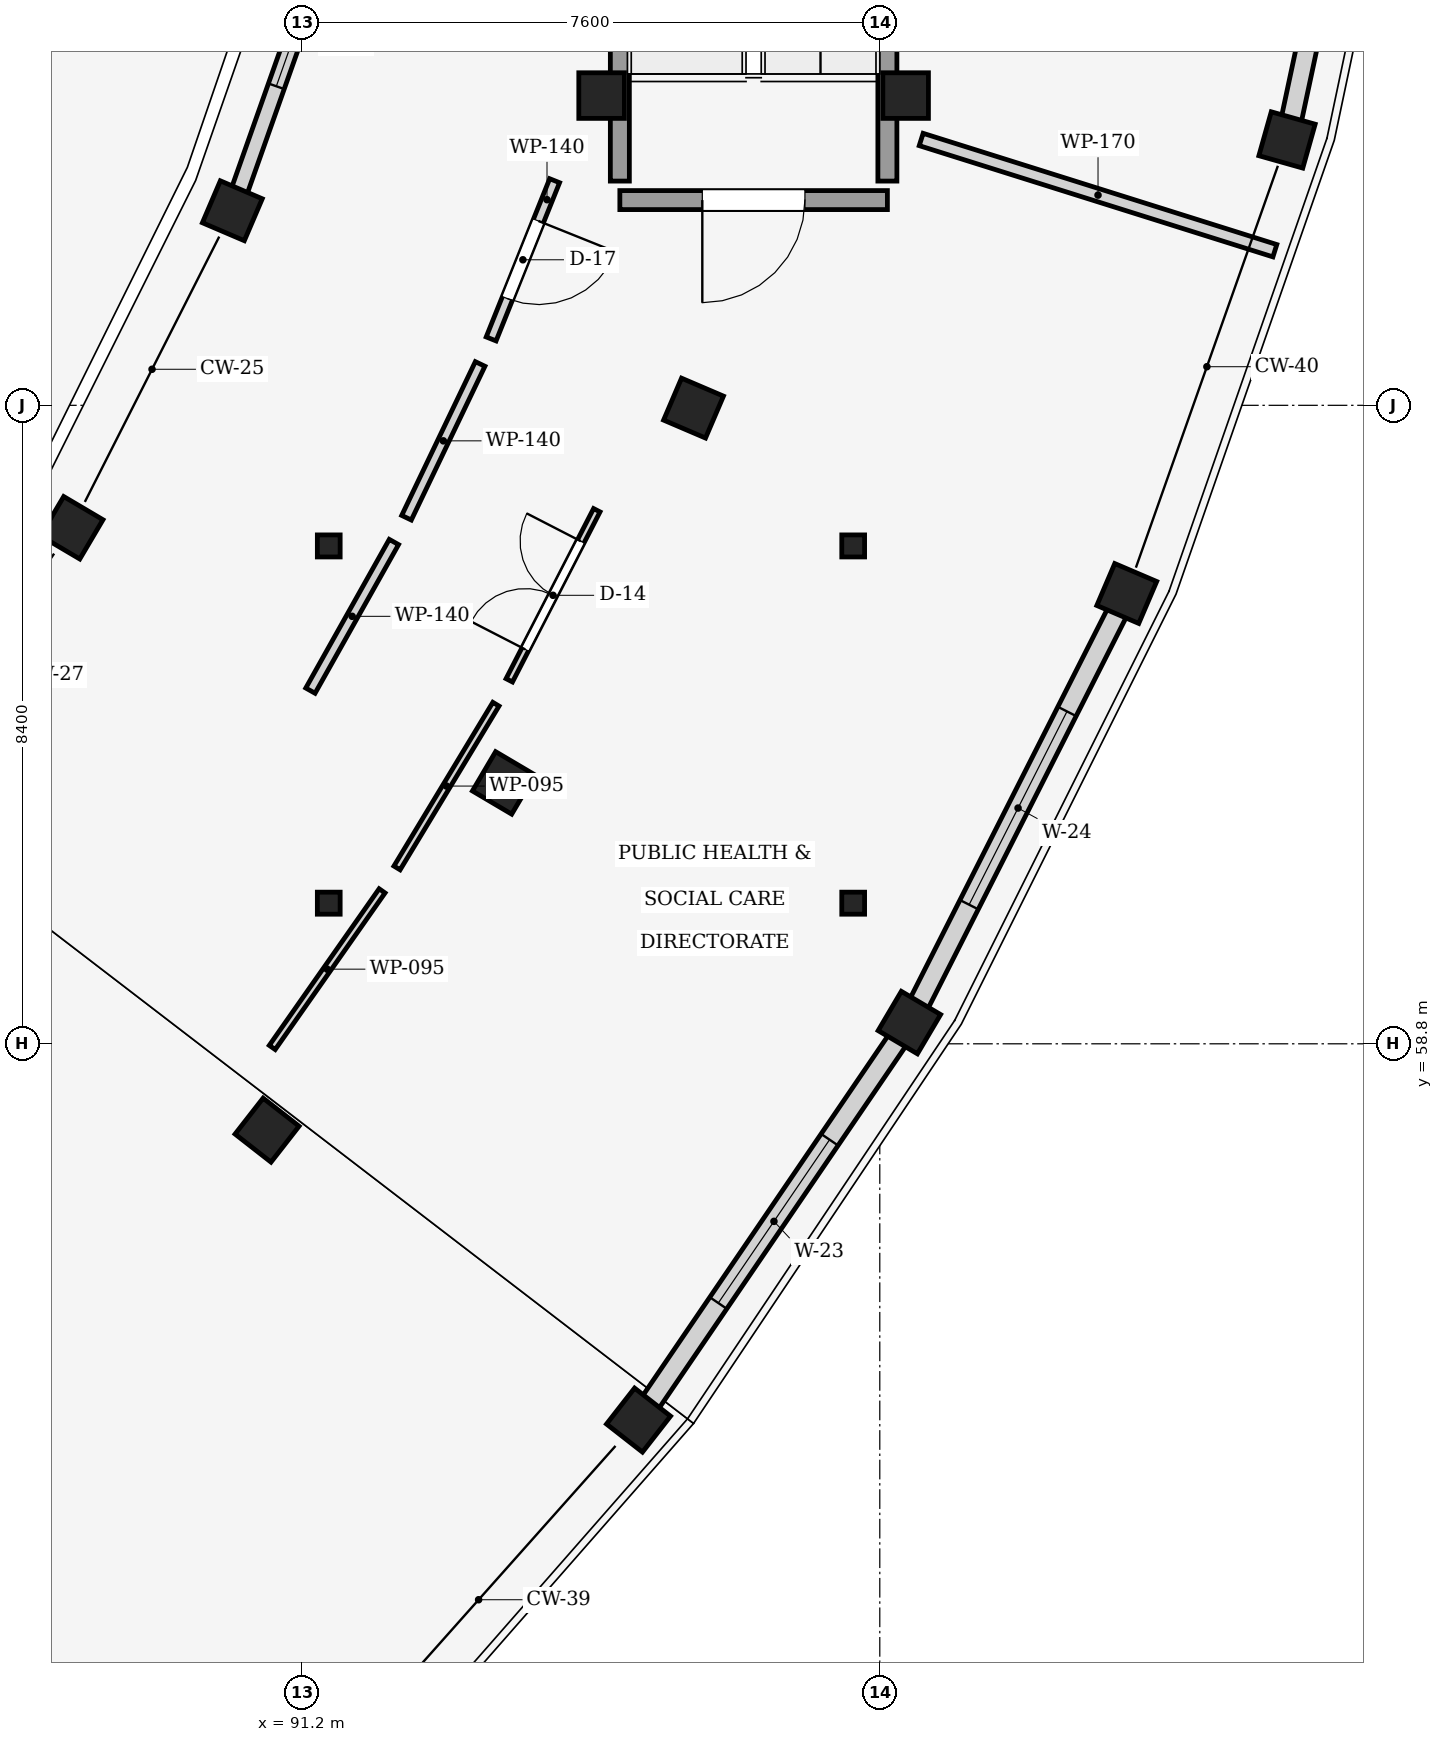
"""IFC4 building model, lengths in metres.
Left out: names, types, materials, properties, quantities, classifications, styles, units other than length and angle.
Written with IfcOpenShell. Run it as: python <this file> out.ifc"""

import sys

from ifc_helpers import new_model, si_unit, direction, frame, frame_2d, origin, origin_2d, place, context, subcontext, project, spatial, rectangle, i_section, extrude, element, fill, save


model = new_model("IFC4")
c1 = context("Model", 3, precision=1e-05, world=origin(), true_north=direction((0.0, 1.0)))
c2 = subcontext(c1, "Body", "Model", "MODEL_VIEW")
j1 = project(units=[si_unit("LENGTHUNIT", "METRE"), si_unit("PLANEANGLEUNIT", "RADIAN")], contexts=[c1])
p1 = place(None, origin())
s1 = spatial("IfcSite", under=j1, at=p1, CompositionType="ELEMENT")
p2 = place(p1, origin())
s2 = spatial("IfcBuilding", under=s1, at=p2, CompositionType="ELEMENT")
p3 = place(p2, frame((0.0, 0.0, 9.15)))
s3 = spatial("IfcBuildingStorey", under=s2, at=p3, CompositionType="ELEMENT", Elevation=9.15)
for number, where, z_axis, x_axis in (
    (1, (90.738, 57.664, 0.0), (0.0, 0.0, 1.0), (0.788, -0.615, 0.0)),
    (2, (95.626, 53.849, 0.0), (0.0, 0.0, 1.0), (0.788, -0.615, 0.0)),
    (3, (88.168, 65.589, 0.0), (0.0, 0.0, 1.0), (0.861, -0.509, 0.0)),
    (4, (93.851, 62.232, 0.0), (0.0, 0.0, 1.0), (0.861, -0.509, 0.0)),
    (5, (99.189, 59.079, 0.0), (0.0, 0.0, 1.0), (0.861, -0.509, 0.0)),
    (6, (90.281, 69.76, 0.0), (0.0, 0.0, 1.0), (0.919, -0.393, 0.0)),
    (7, (96.349, 67.163, 0.0), (0.0, 0.0, 1.0), (0.919, -0.393, 0.0)),
    (8, (102.049, 64.724, 0.0), (0.0, 0.0, 1.0), (0.919, -0.393, 0.0)),
    (9, (104.158, 70.691, 0.0), (0.0, 0.0, 1.0), (0.962, -0.272, 0.0)),
    (10, (99.14, 71.275, 0.0), (0.0, 0.0, 1.0), (1.0, 0.0, 0.0)),
    (11, (95.14, 71.275, 0.0), (0.0, 0.0, 1.0), (1.0, 0.0, 0.0)),
):
    element("IfcColumn", number, at=place(p3, frame(where, z_axis=z_axis, x_axis=x_axis)), inside=s3, PredefinedType="COLUMN", context=c2, shape_type="SweptSolid", body=[
        extrude(rectangle(XDim=0.6, YDim=0.6, at=origin_2d()), origin(), (0.0, 0.0, 1.0), 4.05),
    ])
for number, where, z_axis, x_axis in (
    (12, (91.55, 60.65, 0.0), (0.0, 0.0, 1.0), (1.0, 0.0, 0.0)),
    (13, (98.45, 60.65, 0.0), (0.0, 0.0, 1.0), (1.0, 0.0, 0.0)),
    (14, (98.45, 65.35, 0.0), (0.0, 0.0, 1.0), (1.0, 0.0, 0.0)),
    (15, (91.55, 65.35, 0.0), (0.0, 0.0, 1.0), (1.0, 0.0, 0.0)),
):
    element("IfcColumn", number, at=place(p3, frame(where, z_axis=z_axis, x_axis=x_axis)), inside=s3, PredefinedType="COLUMN", context=c2, shape_type="SweptSolid", body=[
        extrude(i_section(OverallWidth=0.3, OverallDepth=0.29, WebThickness=0.009, FlangeThickness=0.014, at=origin_2d()), origin(), (0.0, 0.0, 1.0), 4.05),
    ])
p4 = place(p3, frame((99.029, 58.844, 0.0), z_axis=(0.0, 0.0, 1.0), x_axis=(-0.563132935525, -0.826366321269, 0.0)))
e16 = element("IfcWall", 16, at=p4, inside=s3, PredefinedType="STANDARD", context=c2, shape_type="SweptSolid", body=[
    extrude(rectangle(XDim=5.76, YDim=0.27, at=frame_2d((2.88, 0.0))), origin(), (0.0, 0.0, 1.0), 3.015),
])
p5 = place(p4, frame((1.58, 0.0, 0.85)))
e17 = element("IfcOpeningElement", 17, at=p5, cuts=e16, PredefinedType="OPENING", context=c2, shape_type="SweptSolid", body=[
    extrude(rectangle(XDim=2.6, YDim=1.65, at=frame_2d((1.3, 0.825))), frame((0.0, 0.145, 0.0), z_axis=(0.0, -1.0, 0.0), x_axis=(1.0, 0.0, 0.0)), (0.0, 0.0, 1.0), 0.29),
])
p6 = place(p3, frame((101.93, 64.49, 0.0), z_axis=(0.0, 0.0, 1.0), x_axis=(-0.451920591159, -0.892058170349, 0.0)))
e18 = element("IfcWall", 18, at=p6, inside=s3, PredefinedType="STANDARD", context=c2, shape_type="SweptSolid", body=[
    extrude(rectangle(XDim=5.802, YDim=0.27, at=frame_2d((2.901, 0.0))), origin(), (0.0, 0.0, 1.0), 3.015),
])
p7 = place(p6, frame((1.476, 0.0, 0.85)))
e19 = element("IfcOpeningElement", 19, at=p7, cuts=e18, PredefinedType="OPENING", context=c2, shape_type="SweptSolid", body=[
    extrude(rectangle(XDim=2.85, YDim=1.65, at=frame_2d((1.425, 0.825))), frame((0.0, 0.145, 0.0), z_axis=(0.0, -1.0, 0.0), x_axis=(1.0, 0.0, 0.0)), (0.0, 0.0, 1.0), 0.29),
])
p8 = place(p3, frame((90.365, 69.995, 0.0), z_axis=(0.0, 0.0, 1.0), x_axis=(0.333168640656, 0.942867253055, 0.0)))
e20 = element("IfcWall", 20, at=p8, inside=s3, PredefinedType="STANDARD", context=c2, shape_type="SweptSolid", body=[
    extrude(rectangle(XDim=4.177, YDim=0.22, at=frame_2d((2.088, 0.0))), origin(), (0.0, 0.0, 1.0), 3.165),
])
p9 = place(p8, frame((1.488, 0.0, 0.85)))
e21 = element("IfcOpeningElement", 21, at=p9, cuts=e20, PredefinedType="OPENING", context=c2, shape_type="SweptSolid", body=[
    extrude(rectangle(XDim=1.2, YDim=1.65, at=frame_2d((0.6, 0.825))), frame((0.0, 0.12, 0.0), z_axis=(0.0, -1.0, 0.0), x_axis=(1.0, 0.0, 0.0)), (0.0, 0.0, 1.0), 0.24),
])
p10 = place(p3, frame((105.43, 76.645, 0.0), z_axis=(0.0, 0.0, 1.0), x_axis=(-0.208873267346, -0.977942717233, 0.0)))
e22 = element("IfcWall", 22, at=p10, inside=s3, PredefinedType="STANDARD", context=c2, shape_type="SweptSolid", body=[
    extrude(rectangle(XDim=5.848, YDim=0.27, at=frame_2d((2.924, 0.0))), origin(), (0.0, 0.0, 1.0), 2.45),
])
p11 = place(p10, frame((2.374, 0.0, 0.85)))
e23 = element("IfcOpeningElement", 23, at=p11, cuts=e22, PredefinedType="OPENING", context=c2, shape_type="SweptSolid", body=[
    extrude(rectangle(XDim=1.1, YDim=1.35, at=frame_2d((0.55, 0.675))), frame((0.0, 0.145, 0.0), z_axis=(0.0, -1.0, 0.0), x_axis=(1.0, 0.0, 0.0)), (0.0, 0.0, 1.0), 0.29),
])
p12 = place(p3, frame((98.9, 69.9, 0.0), z_axis=(0.0, 0.0, 1.0), x_axis=(-1.0, 0.0, 0.0)))
e24 = element("IfcWall", 24, at=p12, inside=s3, PredefinedType="SHEAR", context=c2, shape_type="SweptSolid", body=[
    extrude(rectangle(XDim=3.52, YDim=0.25, at=frame_2d((1.76, 0.0))), origin(), (0.0, 0.0, 1.0), 4.05),
])
p13 = place(p12, frame((1.085, 0.0, 0.0)))
e25 = element("IfcOpeningElement", 25, at=p13, cuts=e24, PredefinedType="OPENING", context=c2, shape_type="SweptSolid", body=[
    extrude(rectangle(XDim=1.35, YDim=2.2, at=frame_2d((0.675, 1.1))), frame((0.0, 0.135, 0.0), z_axis=(0.0, -1.0, 0.0), x_axis=(1.0, 0.0, 0.0)), (0.0, 0.0, 1.0), 0.27),
])
for number, where, z_axis, x_axis in (
    (26, (95.38, 70.15, 0.0), (0.0, 0.0, 1.0), (0.0, 1.0, 0.0)),
    (27, (98.9, 77.85, 0.0), (0.0, 0.0, 1.0), (0.0, -1.0, 0.0)),
):
    element("IfcWall", number, at=place(p3, frame(where, z_axis=z_axis, x_axis=x_axis)), inside=s3, PredefinedType="SHEAR", context=c2, shape_type="SweptSolid", body=[
        extrude(rectangle(XDim=7.7, YDim=0.25, at=frame_2d((3.85, 0.0))), origin(), (0.0, 0.0, 1.0), 4.05),
    ])
p14 = place(p3, frame((92.448, 61.114, 0.0), z_axis=(0.0, 0.0, 1.0), x_axis=(0.517075662266, 0.855939693841, 0.0)))
e28 = element("IfcWall", 28, at=p14, inside=s3, PredefinedType="PARTITIONING", context=c2, shape_type="SweptSolid", body=[
    extrude(rectangle(XDim=2.517, YDim=0.095, at=frame_2d((1.258, 0.0))), origin(), (0.0, 0.0, 1.0), 3.015),
])
p15 = place(p3, frame((93.925, 63.582, 0.0), z_axis=(0.0, 0.0, 1.0), x_axis=(0.457582529718, 0.889167154419, 0.0)))
e29 = element("IfcWall", 29, at=p15, inside=s3, PredefinedType="PARTITIONING", context=c2, shape_type="SweptSolid", body=[
    extrude(rectangle(XDim=2.517, YDim=0.095, at=frame_2d((1.258, 0.0))), origin(), (0.0, 0.0, 1.0), 3.7),
])
p16 = place(p15, frame((0.458, 0.0, 0.0)))
e30 = element("IfcOpeningElement", 30, at=p16, cuts=e29, PredefinedType="OPENING", context=c2, shape_type="SweptSolid", body=[
    extrude(rectangle(XDim=1.6, YDim=2.22, at=frame_2d((0.8, 1.11))), frame((0.0, 0.057, 0.0), z_axis=(0.0, -1.0, 0.0), x_axis=(1.0, 0.0, 0.0)), (0.0, 0.0, 1.0), 0.115),
])
p17 = place(p3, frame((90.807, 58.752, 0.0), z_axis=(0.0, 0.0, 1.0), x_axis=(0.574178276631, 0.818730301531, 0.0)))
e31 = element("IfcWall", 31, at=p17, inside=s3, PredefinedType="PARTITIONING", context=c2, shape_type="SweptSolid", body=[
    extrude(rectangle(XDim=2.517, YDim=0.095, at=frame_2d((1.258, 0.0))), origin(), (0.0, 0.0, 1.0), 3.7),
])
p18 = place(p3, frame((103.998, 69.234, 0.0), z_axis=(0.0, 0.0, 1.0), x_axis=(-0.953940529117, 0.299995778149, 0.0)))
e32 = element("IfcWall", 32, at=p18, inside=s3, PredefinedType="PARTITIONING", context=c2, shape_type="SweptSolid", body=[
    extrude(rectangle(XDim=4.878, YDim=0.17, at=frame_2d((2.439, 0.0))), origin(), (0.0, 0.0, 1.0), 3.165),
])
p19 = place(p3, frame((94.522, 70.155, 0.0), z_axis=(0.0, 0.0, 1.0), x_axis=(-0.372385151869, -0.928078282618, 0.0)))
e33 = element("IfcWall", 33, at=p19, inside=s3, PredefinedType="PARTITIONING", context=c2, shape_type="SweptSolid", body=[
    extrude(rectangle(XDim=2.243, YDim=0.14, at=frame_2d((1.122, 0.0))), origin(), (0.0, 0.0, 1.0), 3.7),
])
p20 = place(p19, frame((0.571, 0.0, 0.0)))
e34 = element("IfcOpeningElement", 34, at=p20, cuts=e33, PredefinedType="OPENING", context=c2, shape_type="SweptSolid", body=[
    extrude(rectangle(XDim=1.1, YDim=2.35, at=frame_2d((0.55, 1.175))), frame((0.0, 0.08, 0.0), z_axis=(0.0, -1.0, 0.0), x_axis=(1.0, 0.0, 0.0)), (0.0, 0.0, 1.0), 0.16),
])
p21 = place(p3, frame((93.542, 67.744, 0.0), z_axis=(0.0, 0.0, 1.0), x_axis=(-0.431998462729, -0.901874341691, 0.0)))
e35 = element("IfcWall", 35, at=p21, inside=s3, PredefinedType="PARTITIONING", context=c2, shape_type="SweptSolid", body=[
    extrude(rectangle(XDim=2.243, YDim=0.14, at=frame_2d((1.122, 0.0))), origin(), (0.0, 0.0, 1.0), 3.7),
])
p22 = place(p3, frame((92.407, 65.402, 0.0), z_axis=(0.0, 0.0, 1.0), x_axis=(-0.489666870942, -0.871909602827, 0.0)))
e36 = element("IfcWall", 36, at=p22, inside=s3, PredefinedType="PARTITIONING", context=c2, shape_type="SweptSolid", body=[
    extrude(rectangle(XDim=2.243, YDim=0.14, at=frame_2d((1.122, 0.0))), origin(), (0.0, 0.0, 1.0), 3.015),
])
p23 = place(p5, origin())
e37 = element("IfcWindow", 37, at=p23, inside=s3, PartitioningType="SINGLE_PANEL", PredefinedType="WINDOW", context=c2, shape_type="SweptSolid", body=[
    extrude(rectangle(XDim=2.6, YDim=1.65, at=frame_2d((1.3, 0.825))), frame((0.0, 0.03, 0.0), z_axis=(0.0, -1.0, 0.0), x_axis=(1.0, 0.0, 0.0)), (0.0, 0.0, 1.0), 0.06),
])
fill(e17, e37)
p24 = place(p7, origin())
e38 = element("IfcWindow", 38, at=p24, inside=s3, PartitioningType="SINGLE_PANEL", PredefinedType="WINDOW", context=c2, shape_type="SweptSolid", body=[
    extrude(rectangle(XDim=2.85, YDim=1.65, at=frame_2d((1.425, 0.825))), frame((0.0, 0.03, 0.0), z_axis=(0.0, -1.0, 0.0), x_axis=(1.0, 0.0, 0.0)), (0.0, 0.0, 1.0), 0.06),
])
fill(e19, e38)
p25 = place(p9, origin())
e39 = element("IfcWindow", 39, at=p25, inside=s3, PartitioningType="SINGLE_PANEL", PredefinedType="WINDOW", context=c2, shape_type="SweptSolid", body=[
    extrude(rectangle(XDim=1.2, YDim=1.65, at=frame_2d((0.6, 0.825))), frame((0.0, 0.03, 0.0), z_axis=(0.0, -1.0, 0.0), x_axis=(1.0, 0.0, 0.0)), (0.0, 0.0, 1.0), 0.06),
])
fill(e21, e39)
p26 = place(p13, origin())
e40 = element("IfcDoor", 40, at=p26, inside=s3, OperationType="SINGLE_SWING_RIGHT", PredefinedType="DOOR", context=c2, shape_type="SweptSolid", body=[
    extrude(rectangle(XDim=1.35, YDim=2.2, at=frame_2d((0.675, 1.1))), frame((0.0, 0.025, 0.0), z_axis=(0.0, -1.0, 0.0), x_axis=(1.0, 0.0, 0.0)), (0.0, 0.0, 1.0), 0.05),
])
fill(e25, e40)
p27 = place(p16, origin())
e41 = element("IfcDoor", 41, at=p27, inside=s3, OperationType="DOUBLE_DOOR_SINGLE_SWING", PredefinedType="DOOR", context=c2, shape_type="SweptSolid", body=[
    extrude(rectangle(XDim=1.6, YDim=2.22, at=frame_2d((0.8, 1.11))), frame((0.0, 0.025, 0.0), z_axis=(0.0, -1.0, 0.0), x_axis=(1.0, 0.0, 0.0)), (0.0, 0.0, 1.0), 0.05),
])
fill(e30, e41)
p28 = place(p20, origin())
e42 = element("IfcDoor", 42, at=p28, inside=s3, OperationType="SINGLE_SWING_LEFT", PredefinedType="DOOR", context=c2, shape_type="SweptSolid", body=[
    extrude(rectangle(XDim=1.1, YDim=2.35, at=frame_2d((0.55, 1.175))), frame((0.0, 0.025, 0.0), z_axis=(0.0, -1.0, 0.0), x_axis=(1.0, 0.0, 0.0)), (0.0, 0.0, 1.0), 0.05),
])
fill(e34, e42)
save(model, sys.argv[1])
